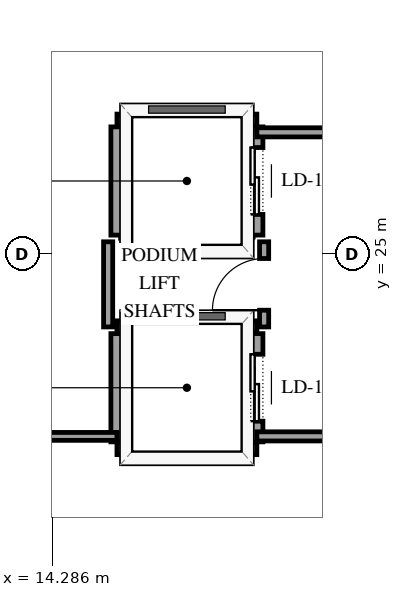
"""IFC4 building model, lengths in metres.
Left out: names, types, materials, properties, quantities, classifications, styles, units other than length and angle.
Written with IfcOpenShell. Run it as: python <this file> out.ifc"""

import sys

from ifc_helpers import new_model, si_unit, direction, frame, frame_2d, origin, place, context, subcontext, project, spatial, rectangle, extrude, element, fill, save


model = new_model("IFC4")
c1 = context("Model", 3, precision=1e-05, world=origin(), true_north=direction((0.0, 1.0)))
c2 = subcontext(c1, "Body", "Model", "MODEL_VIEW")
j1 = project(units=[si_unit("LENGTHUNIT", "METRE"), si_unit("PLANEANGLEUNIT", "RADIAN")], contexts=[c1])
p1 = place(None, origin())
s1 = spatial("IfcSite", under=j1, at=p1, CompositionType="ELEMENT")
p2 = place(p1, origin())
s2 = spatial("IfcBuilding", under=s1, at=p2, CompositionType="ELEMENT")
p3 = place(p2, frame((0.0, 0.0, 6.0)))
s3 = spatial("IfcBuildingStorey", under=s2, at=p3, CompositionType="ELEMENT", Elevation=6.0)
for number, where, z_axis, x_axis in (
    (1, (15.35, 21.8, 0.0), (0.0, 0.0, 1.0), (1.0, 0.0, 0.0)),
    (2, (15.35, 23.8, 0.0), (0.0, 0.0, 1.0), (1.0, 0.0, 0.0)),
):
    element("IfcWall", number, at=place(p3, frame(where, z_axis=z_axis, x_axis=x_axis)), inside=s3, PredefinedType="SOLIDWALL", context=c2, shape_type="SweptSolid", body=[
        extrude(rectangle(XDim=2.3, YDim=0.2, at=frame_2d((1.15, 0.0))), origin(), (0.0, 0.0, 1.0), 5.08),
    ])
p4 = place(p3, frame((15.35, 21.91, 0.0), z_axis=(0.0, 0.0, 1.0), x_axis=(0.0, 1.0, 0.0)))
e3 = element("IfcWall", 3, at=p4, inside=s3, PredefinedType="SOLIDWALL", context=c2, shape_type="SweptSolid", body=[
    extrude(rectangle(XDim=1.78, YDim=0.2, at=frame_2d((0.89, 0.0))), origin(), (0.0, 0.0, 1.0), 5.08),
])
p5 = place(p3, frame((17.65, 21.91, 0.0), z_axis=(0.0, 0.0, 1.0), x_axis=(0.0, 1.0, 0.0)))
e4 = element("IfcWall", 4, at=p5, inside=s3, PredefinedType="SOLIDWALL", context=c2, shape_type="SweptSolid", body=[
    extrude(rectangle(XDim=1.78, YDim=0.2, at=frame_2d((0.89, 0.0))), origin(), (0.0, 0.0, 1.0), 5.08),
])
p6 = place(p5, frame((0.34, 0.0, 0.0)))
e5 = element("IfcOpeningElement", 5, at=p6, cuts=e4, PredefinedType="OPENING", context=c2, shape_type="SweptSolid", body=[
    extrude(rectangle(XDim=1.1, YDim=2.15, at=frame_2d((0.55, 1.075))), frame((0.0, 0.11, 0.0), z_axis=(0.0, -1.0, 0.0), x_axis=(1.0, 0.0, 0.0)), (0.0, 0.0, 1.0), 0.22),
])
p7 = place(p3, frame((15.35, 27.2, 0.0), z_axis=(0.0, 0.0, 1.0), x_axis=(1.0, 0.0, 0.0)))
e6 = element("IfcWall", 6, at=p7, inside=s3, PredefinedType="SOLIDWALL", context=c2, shape_type="SweptSolid", body=[
    extrude(rectangle(XDim=2.3, YDim=0.2, at=frame_2d((1.15, 0.0))), origin(), (0.0, 0.0, 1.0), 5.08),
])
p8 = place(p3, frame((15.35, 25.31, 0.0), z_axis=(0.0, 0.0, 1.0), x_axis=(0.0, 1.0, 0.0)))
e7 = element("IfcWall", 7, at=p8, inside=s3, PredefinedType="SOLIDWALL", context=c2, shape_type="SweptSolid", body=[
    extrude(rectangle(XDim=1.78, YDim=0.2, at=frame_2d((0.89, 0.0))), origin(), (0.0, 0.0, 1.0), 5.08),
])
p9 = place(p3, frame((17.65, 25.31, 0.0), z_axis=(0.0, 0.0, 1.0), x_axis=(0.0, 1.0, 0.0)))
e8 = element("IfcWall", 8, at=p9, inside=s3, PredefinedType="SOLIDWALL", context=c2, shape_type="SweptSolid", body=[
    extrude(rectangle(XDim=1.78, YDim=0.2, at=frame_2d((0.89, 0.0))), origin(), (0.0, 0.0, 1.0), 5.08),
])
p10 = place(p9, frame((0.34, 0.0, 0.0)))
e9 = element("IfcOpeningElement", 9, at=p10, cuts=e8, PredefinedType="OPENING", context=c2, shape_type="SweptSolid", body=[
    extrude(rectangle(XDim=1.1, YDim=2.15, at=frame_2d((0.55, 1.075))), frame((0.0, 0.11, 0.0), z_axis=(0.0, -1.0, 0.0), x_axis=(1.0, 0.0, 0.0)), (0.0, 0.0, 1.0), 0.22),
])
p11 = place(p3, frame((0.0, 22.0, 0.0), z_axis=(0.0, 0.0, 1.0), x_axis=(1.0, 0.0, 0.0)))
e10 = element("IfcWall", 10, at=p11, inside=s3, PredefinedType="PARTITIONING", context=c2, shape_type="SweptSolid", body=[
    extrude(rectangle(XDim=15.35, YDim=0.13, at=frame_2d((7.675, 0.0))), origin(), (0.0, 0.0, 1.0), 5.08),
])
p12 = place(p3, frame((30.53, 22.0, 0.0), z_axis=(0.0, 0.0, 1.0), x_axis=(-1.0, 0.0, 0.0)))
e11 = element("IfcWall", 11, at=p12, inside=s3, PredefinedType="PARTITIONING", context=c2, shape_type="SweptSolid", body=[
    extrude(rectangle(XDim=12.88, YDim=0.15, at=frame_2d((6.44, 0.0))), origin(), (0.0, 0.0, 1.0), 5.08),
])
p13 = place(p3, frame((17.65, 27.0, 0.0), z_axis=(0.0, 0.0, 1.0), x_axis=(1.0, 0.0, 0.0)))
e12 = element("IfcWall", 12, at=p13, inside=s3, PredefinedType="PARTITIONING", context=c2, shape_type="SweptSolid", body=[
    extrude(rectangle(XDim=12.88, YDim=0.15, at=frame_2d((6.44, 0.0))), origin(), (0.0, 0.0, 1.0), 5.08),
])
p14 = place(p13, frame((5.965, 0.0, 0.0)))
e13 = element("IfcOpeningElement", 13, at=p14, cuts=e12, PredefinedType="OPENING", context=c2, shape_type="SweptSolid", body=[
    extrude(rectangle(XDim=0.92, YDim=2.12, at=frame_2d((0.46, 1.06))), frame((0.0, 0.085, 0.0), z_axis=(0.0, -1.0, 0.0), x_axis=(1.0, 0.0, 0.0)), (0.0, 0.0, 1.0), 0.17),
])
p15 = place(p3, frame((17.77, 23.8, 0.0), z_axis=(0.0, 0.0, 1.0), x_axis=(0.0, 1.0, 0.0)))
e14 = element("IfcWall", 14, at=p15, inside=s3, PredefinedType="PARTITIONING", context=c2, shape_type="SweptSolid", body=[
    extrude(rectangle(XDim=1.4, YDim=0.15, at=frame_2d((0.7, 0.0))), origin(), (0.0, 0.0, 1.0), 5.08),
])
p16 = place(p15, frame((0.275, 0.0, 0.0)))
e15 = element("IfcOpeningElement", 15, at=p16, cuts=e14, PredefinedType="OPENING", context=c2, shape_type="SweptSolid", body=[
    extrude(rectangle(XDim=0.85, YDim=2.1, at=frame_2d((0.425, 1.05))), frame((0.0, 0.085, 0.0), z_axis=(0.0, -1.0, 0.0), x_axis=(1.0, 0.0, 0.0)), (0.0, 0.0, 1.0), 0.17),
])
p17 = place(p3, frame((15.205, 23.8, 0.0), z_axis=(0.0, 0.0, 1.0), x_axis=(0.0, 1.0, 0.0)))
e16 = element("IfcWall", 16, at=p17, inside=s3, PredefinedType="PARTITIONING", context=c2, shape_type="SweptSolid", body=[
    extrude(rectangle(XDim=1.4, YDim=0.15, at=frame_2d((0.7, 0.0))), origin(), (0.0, 0.0, 1.0), 5.08),
])
p18 = place(p6, origin())
e17 = element("IfcDoor", 17, at=p18, inside=s3, OperationType="SLIDING_TO_LEFT", PredefinedType="DOOR", context=c2, shape_type="SweptSolid", body=[
    extrude(rectangle(XDim=1.1, YDim=2.15, at=frame_2d((0.55, 1.075))), frame((0.0, 0.025, 0.0), z_axis=(0.0, -1.0, 0.0), x_axis=(1.0, 0.0, 0.0)), (0.0, 0.0, 1.0), 0.05),
])
fill(e5, e17)
p19 = place(p10, origin())
e18 = element("IfcDoor", 18, at=p19, inside=s3, OperationType="SLIDING_TO_LEFT", PredefinedType="DOOR", context=c2, shape_type="SweptSolid", body=[
    extrude(rectangle(XDim=1.1, YDim=2.15, at=frame_2d((0.55, 1.075))), frame((0.0, 0.025, 0.0), z_axis=(0.0, -1.0, 0.0), x_axis=(1.0, 0.0, 0.0)), (0.0, 0.0, 1.0), 0.05),
])
fill(e9, e18)
p20 = place(p16, origin())
e19 = element("IfcDoor", 19, at=p20, inside=s3, OperationType="SINGLE_SWING_LEFT", PredefinedType="DOOR", context=c2, shape_type="SweptSolid", body=[
    extrude(rectangle(XDim=0.85, YDim=2.1, at=frame_2d((0.425, 1.05))), frame((0.0, 0.025, 0.0), z_axis=(0.0, -1.0, 0.0), x_axis=(1.0, 0.0, 0.0)), (0.0, 0.0, 1.0), 0.05),
])
fill(e15, e19)
save(model, sys.argv[1])
